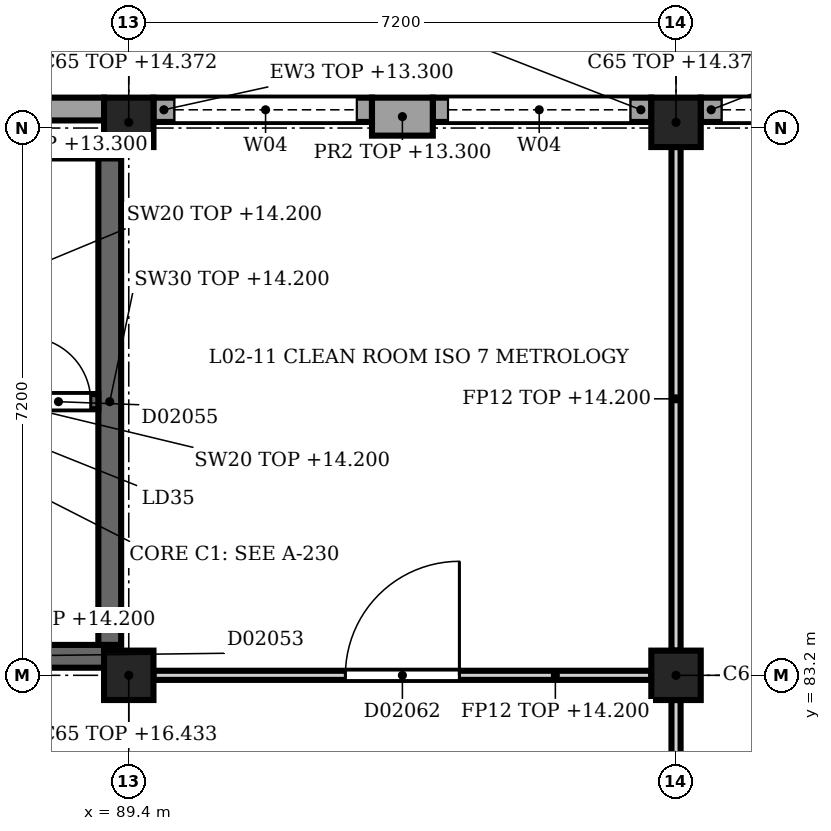
"""IFC4 building model, lengths in metres.
Left out: names, types, materials, properties, quantities, classifications, styles, units other than length and angle.
Written with IfcOpenShell. Run it as: python <this file> out.ifc"""

import sys

from ifc_helpers import new_model, si_unit, direction, frame, frame_2d, origin, origin_2d, place, context, subcontext, project, spatial, rectangle, extrude, element, fill, save


model = new_model("IFC4")
c1 = context("Model", 3, precision=1e-05, world=origin(), true_north=direction((0.0, 1.0)))
c2 = subcontext(c1, "Body", "Model", "MODEL_VIEW")
j1 = project(units=[si_unit("LENGTHUNIT", "METRE"), si_unit("PLANEANGLEUNIT", "RADIAN")], contexts=[c1])
p1 = place(None, origin())
s1 = spatial("IfcSite", under=j1, at=p1, CompositionType="ELEMENT")
p2 = place(p1, origin())
s2 = spatial("IfcBuilding", under=s1, at=p2, CompositionType="ELEMENT")
p3 = place(p2, frame((0.0, 0.0, 9.9)))
s3 = spatial("IfcBuildingStorey", under=s2, at=p3, CompositionType="ELEMENT", Elevation=9.9)
p4 = place(p3, frame((89.4, 83.2, 0.0), z_axis=(0.0, 0.0, 1.0), x_axis=(1.0, 0.0, 0.0)))
e1 = element("IfcColumn", 1, at=p4, inside=s3, PredefinedType="COLUMN", context=c2, shape_type="SweptSolid", body=[
    extrude(rectangle(XDim=0.65, YDim=0.65, at=origin_2d()), origin(), (0.0, 0.0, 1.0), 6.533),
])
p5 = place(p3, frame((89.4, 90.475, 0.0), z_axis=(0.0, 0.0, 1.0), x_axis=(1.0, 0.0, 0.0)))
e2 = element("IfcColumn", 2, at=p5, inside=s3, PredefinedType="COLUMN", context=c2, shape_type="SweptSolid", body=[
    extrude(rectangle(XDim=0.65, YDim=0.65, at=origin_2d()), origin(), (0.0, 0.0, 1.0), 4.472),
])
p6 = place(p3, frame((96.6, 83.2, 0.0), z_axis=(0.0, 0.0, 1.0), x_axis=(1.0, 0.0, 0.0)))
e3 = element("IfcColumn", 3, at=p6, inside=s3, PredefinedType="COLUMN", context=c2, shape_type="SweptSolid", body=[
    extrude(rectangle(XDim=0.65, YDim=0.65, at=origin_2d()), origin(), (0.0, 0.0, 1.0), 7.11),
])
p7 = place(p3, frame((96.6, 90.475, 0.0), z_axis=(0.0, 0.0, 1.0), x_axis=(1.0, 0.0, 0.0)))
e4 = element("IfcColumn", 4, at=p7, inside=s3, PredefinedType="COLUMN", context=c2, shape_type="SweptSolid", body=[
    extrude(rectangle(XDim=0.65, YDim=0.65, at=origin_2d()), origin(), (0.0, 0.0, 1.0), 4.472),
])
p8 = place(p3, frame((92.6, 90.55, 0.0), z_axis=(0.0, 0.0, 1.0), x_axis=(1.0, 0.0, 0.0)))
e5 = element("IfcWall", 5, at=p8, inside=s3, PredefinedType="SOLIDWALL", context=c2, shape_type="SweptSolid", body=[
    extrude(rectangle(XDim=0.8, YDim=0.5, at=frame_2d((0.4, 0.0))), origin(), (0.0, 0.0, 1.0), 3.4),
])
p9 = place(p3, frame((86.2, 90.65, 0.0), z_axis=(0.0, 0.0, 1.0), x_axis=(1.0, 0.0, 0.0)))
e6 = element("IfcWall", 6, at=p9, inside=s3, PredefinedType="SOLIDWALL", context=c2, shape_type="SweptSolid", body=[
    extrude(rectangle(XDim=2.875, YDim=0.3, at=frame_2d((1.438, 0.0))), origin(), (0.0, 0.0, 1.0), 3.4),
])
p10 = place(p3, frame((89.725, 90.64, 0.0), z_axis=(0.0, 0.0, 1.0), x_axis=(1.0, 0.0, 0.0)))
e7 = element("IfcWall", 7, at=p10, inside=s3, PredefinedType="SOLIDWALL", context=c2, shape_type="SweptSolid", body=[
    extrude(rectangle(XDim=2.875, YDim=0.32, at=frame_2d((1.438, 0.0))), origin(), (0.0, 0.0, 1.0), 3.4),
])
p11 = place(p10, frame((0.275, 0.0, 1.9)))
e8 = element("IfcOpeningElement", 8, at=p11, cuts=e7, PredefinedType="OPENING", context=c2, shape_type="SweptSolid", body=[
    extrude(rectangle(XDim=2.4, YDim=1.2, at=frame_2d((1.2, 0.6))), frame((0.0, 0.17, 0.0), z_axis=(0.0, -1.0, 0.0), x_axis=(1.0, 0.0, 0.0)), (0.0, 0.0, 1.0), 0.34),
])
p12 = place(p3, frame((93.4, 90.64, 0.0), z_axis=(0.0, 0.0, 1.0), x_axis=(1.0, 0.0, 0.0)))
e9 = element("IfcWall", 9, at=p12, inside=s3, PredefinedType="SOLIDWALL", context=c2, shape_type="SweptSolid", body=[
    extrude(rectangle(XDim=2.875, YDim=0.32, at=frame_2d((1.438, 0.0))), origin(), (0.0, 0.0, 1.0), 3.4),
])
p13 = place(p12, frame((0.2, 0.0, 1.9)))
e10 = element("IfcOpeningElement", 10, at=p13, cuts=e9, PredefinedType="OPENING", context=c2, shape_type="SweptSolid", body=[
    extrude(rectangle(XDim=2.4, YDim=1.2, at=frame_2d((1.2, 0.6))), frame((0.0, 0.17, 0.0), z_axis=(0.0, -1.0, 0.0), x_axis=(1.0, 0.0, 0.0)), (0.0, 0.0, 1.0), 0.34),
])
p14 = place(p3, frame((96.925, 90.64, 0.0), z_axis=(0.0, 0.0, 1.0), x_axis=(1.0, 0.0, 0.0)))
e11 = element("IfcWall", 11, at=p14, inside=s3, PredefinedType="SOLIDWALL", context=c2, shape_type="SweptSolid", body=[
    extrude(rectangle(XDim=2.875, YDim=0.32, at=frame_2d((1.438, 0.0))), origin(), (0.0, 0.0, 1.0), 3.4),
])
p15 = place(p14, frame((0.275, 0.0, 1.9)))
e12 = element("IfcOpeningElement", 12, at=p15, cuts=e11, PredefinedType="OPENING", context=c2, shape_type="SweptSolid", body=[
    extrude(rectangle(XDim=2.4, YDim=1.2, at=frame_2d((1.2, 0.6))), frame((0.0, 0.17, 0.0), z_axis=(0.0, -1.0, 0.0), x_axis=(1.0, 0.0, 0.0)), (0.0, 0.0, 1.0), 0.34),
])
p16 = place(p3, frame((82.525, 83.45, 0.0), z_axis=(0.0, 0.0, 1.0), x_axis=(1.0, 0.0, 0.0)))
e13 = element("IfcWall", 13, at=p16, inside=s3, PredefinedType="SHEAR", context=c2, shape_type="SweptSolid", body=[
    extrude(rectangle(XDim=6.55, YDim=0.3, at=frame_2d((3.275, 0.0))), origin(), (0.0, 0.0, 1.0), 4.3),
])
p17 = place(p16, frame((4.275, 0.0, 0.0)))
e14 = element("IfcOpeningElement", 14, at=p17, cuts=e13, PredefinedType="OPENING", context=c2, shape_type="SweptSolid", body=[
    extrude(rectangle(XDim=1.2, YDim=2.1, at=frame_2d((0.6, 1.05))), frame((0.0, 0.16, 0.0), z_axis=(0.0, -1.0, 0.0), x_axis=(1.0, 0.0, 0.0)), (0.0, 0.0, 1.0), 0.32),
])
p18 = place(p3, frame((82.525, 90.15, 0.0), z_axis=(0.0, 0.0, 1.0), x_axis=(1.0, 0.0, 0.0)))
e15 = element("IfcWall", 15, at=p18, inside=s3, PredefinedType="SHEAR", context=c2, shape_type="SweptSolid", body=[
    extrude(rectangle(XDim=6.55, YDim=0.3, at=frame_2d((3.275, 0.0))), origin(), (0.0, 0.0, 1.0), 4.3),
])
p19 = place(p18, frame((1.175, 0.0, 1.2)))
e16 = element("IfcOpeningElement", 16, at=p19, cuts=e15, PredefinedType="OPENING", context=c2, shape_type="SweptSolid", body=[
    extrude(rectangle(XDim=0.6, YDim=1.8, at=frame_2d((0.3, 0.9))), frame((0.0, 0.16, 0.0), z_axis=(0.0, -1.0, 0.0), x_axis=(1.0, 0.0, 0.0)), (0.0, 0.0, 1.0), 0.32),
])
p20 = place(p3, frame((89.15, 83.6, 0.0), z_axis=(0.0, 0.0, 1.0), x_axis=(0.0, 1.0, 0.0)))
e17 = element("IfcWall", 17, at=p20, inside=s3, PredefinedType="SHEAR", context=c2, shape_type="SweptSolid", body=[
    extrude(rectangle(XDim=6.4, YDim=0.3, at=frame_2d((3.2, 0.0))), origin(), (0.0, 0.0, 1.0), 4.3),
])
p21 = place(p3, frame((89.0, 86.8, 0.0), z_axis=(0.0, 0.0, 1.0), x_axis=(-1.0, 0.0, 0.0)))
e18 = element("IfcWall", 18, at=p21, inside=s3, PredefinedType="SHEAR", context=c2, shape_type="SweptSolid", body=[
    extrude(rectangle(XDim=3.25, YDim=0.2, at=frame_2d((1.625, 0.0))), origin(), (0.0, 0.0, 1.0), 4.3),
])
p22 = place(p21, frame((1.55, 0.0, 0.0)))
e19 = element("IfcOpeningElement", 19, at=p22, cuts=e18, PredefinedType="OPENING", context=c2, shape_type="SweptSolid", body=[
    extrude(rectangle(XDim=1.4, YDim=2.1, at=frame_2d((0.7, 1.05))), frame((0.0, 0.11, 0.0), z_axis=(0.0, -1.0, 0.0), x_axis=(1.0, 0.0, 0.0)), (0.0, 0.0, 1.0), 0.22),
])
p23 = place(p21, frame((0.1, 0.0, 0.0)))
e20 = element("IfcOpeningElement", 20, at=p23, cuts=e18, PredefinedType="OPENING", context=c2, shape_type="SweptSolid", body=[
    extrude(rectangle(XDim=0.85, YDim=2.1, at=frame_2d((0.425, 1.05))), frame((0.0, 0.11, 0.0), z_axis=(0.0, -1.0, 0.0), x_axis=(1.0, 0.0, 0.0)), (0.0, 0.0, 1.0), 0.22),
])
p24 = place(p3, frame((89.725, 83.2, 0.0), z_axis=(0.0, 0.0, 1.0), x_axis=(1.0, 0.0, 0.0)))
e21 = element("IfcWall", 21, at=p24, inside=s3, PredefinedType="PARTITIONING", context=c2, shape_type="SweptSolid", body=[
    extrude(rectangle(XDim=6.55, YDim=0.12, at=frame_2d((3.275, 0.0))), origin(), (0.0, 0.0, 1.0), 4.3),
])
p25 = place(p24, frame((2.525, 0.0, 0.0)))
e22 = element("IfcOpeningElement", 22, at=p25, cuts=e21, PredefinedType="OPENING", context=c2, shape_type="SweptSolid", body=[
    extrude(rectangle(XDim=1.5, YDim=2.2, at=frame_2d((0.75, 1.1))), frame((0.0, 0.07, 0.0), z_axis=(0.0, -1.0, 0.0), x_axis=(1.0, 0.0, 0.0)), (0.0, 0.0, 1.0), 0.14),
])
p26 = place(p3, frame((96.6, 82.875, 0.0), z_axis=(0.0, 0.0, 1.0), x_axis=(0.0, -1.0, 0.0)))
e23 = element("IfcWall", 23, at=p26, inside=s3, PredefinedType="PARTITIONING", context=c2, shape_type="SweptSolid", body=[
    extrude(rectangle(XDim=6.55, YDim=0.12, at=frame_2d((3.275, 0.0))), origin(), (0.0, 0.0, 1.0), 4.3),
])
p27 = place(p26, frame((2.525, 0.0, 0.0)))
e24 = element("IfcOpeningElement", 24, at=p27, cuts=e23, PredefinedType="OPENING", context=c2, shape_type="SweptSolid", body=[
    extrude(rectangle(XDim=1.5, YDim=2.2, at=frame_2d((0.75, 1.1))), frame((0.0, 0.07, 0.0), z_axis=(0.0, -1.0, 0.0), x_axis=(1.0, 0.0, 0.0)), (0.0, 0.0, 1.0), 0.14),
])
p28 = place(p3, frame((96.6, 83.525, 0.0), z_axis=(0.0, 0.0, 1.0), x_axis=(0.0, 1.0, 0.0)))
e25 = element("IfcWall", 25, at=p28, inside=s3, PredefinedType="PARTITIONING", context=c2, shape_type="SweptSolid", body=[
    extrude(rectangle(XDim=6.625, YDim=0.12, at=frame_2d((3.312, 0.0))), origin(), (0.0, 0.0, 1.0), 4.3),
])
p29 = place(p11, origin())
e26 = element("IfcWindow", 26, at=p29, inside=s3, PartitioningType="SINGLE_PANEL", PredefinedType="WINDOW", context=c2, shape_type="SweptSolid", body=[
    extrude(rectangle(XDim=2.4, YDim=1.2, at=frame_2d((1.2, 0.6))), frame((0.0, 0.03, 0.0), z_axis=(0.0, -1.0, 0.0), x_axis=(1.0, 0.0, 0.0)), (0.0, 0.0, 1.0), 0.06),
])
fill(e8, e26)
p30 = place(p13, origin())
e27 = element("IfcWindow", 27, at=p30, inside=s3, PartitioningType="SINGLE_PANEL", PredefinedType="WINDOW", context=c2, shape_type="SweptSolid", body=[
    extrude(rectangle(XDim=2.4, YDim=1.2, at=frame_2d((1.2, 0.6))), frame((0.0, 0.03, 0.0), z_axis=(0.0, -1.0, 0.0), x_axis=(1.0, 0.0, 0.0)), (0.0, 0.0, 1.0), 0.06),
])
fill(e10, e27)
p31 = place(p15, origin())
e28 = element("IfcWindow", 28, at=p31, inside=s3, PartitioningType="SINGLE_PANEL", PredefinedType="WINDOW", context=c2, shape_type="SweptSolid", body=[
    extrude(rectangle(XDim=2.4, YDim=1.2, at=frame_2d((1.2, 0.6))), frame((0.0, 0.03, 0.0), z_axis=(0.0, -1.0, 0.0), x_axis=(1.0, 0.0, 0.0)), (0.0, 0.0, 1.0), 0.06),
])
fill(e12, e28)
p32 = place(p23, origin())
e29 = element("IfcDoor", 29, at=p32, inside=s3, OperationType="SINGLE_SWING_LEFT", PredefinedType="DOOR", context=c2, shape_type="SweptSolid", body=[
    extrude(rectangle(XDim=0.85, YDim=2.1, at=frame_2d((0.425, 1.05))), frame((0.0, 0.025, 0.0), z_axis=(0.0, -1.0, 0.0), x_axis=(1.0, 0.0, 0.0)), (0.0, 0.0, 1.0), 0.05),
])
fill(e20, e29)
p33 = place(p25, origin())
e30 = element("IfcDoor", 30, at=p33, inside=s3, OperationType="SINGLE_SWING_LEFT", PredefinedType="DOOR", context=c2, shape_type="SweptSolid", body=[
    extrude(rectangle(XDim=1.5, YDim=2.2, at=frame_2d((0.75, 1.1))), frame((0.0, 0.025, 0.0), z_axis=(0.0, -1.0, 0.0), x_axis=(1.0, 0.0, 0.0)), (0.0, 0.0, 1.0), 0.05),
])
fill(e22, e30)
save(model, sys.argv[1])
